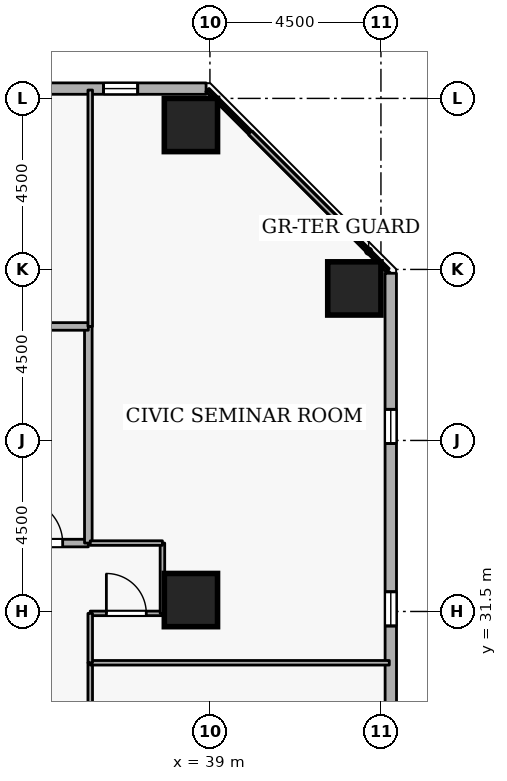
"""IFC4 building model, lengths in metres.
Left out: names, types, materials, properties, quantities, classifications, styles, units other than length and angle.
Written with IfcOpenShell. Run it as: python <this file> out.ifc"""

import sys

from ifc_helpers import new_model, si_unit, direction, frame, frame_2d, origin, origin_2d, place, context, subcontext, project, spatial, rectangle, extrude, element, fill, save


model = new_model("IFC4")
c1 = context("Model", 3, precision=1e-05, world=origin(), true_north=direction((0.0, 1.0)))
c2 = subcontext(c1, "Body", "Model", "MODEL_VIEW")
j1 = project(units=[si_unit("LENGTHUNIT", "METRE"), si_unit("PLANEANGLEUNIT", "RADIAN")], contexts=[c1])
p1 = place(None, origin())
s1 = spatial("IfcSite", under=j1, at=p1, CompositionType="ELEMENT")
p2 = place(p1, origin())
s2 = spatial("IfcBuilding", under=s1, at=p2, CompositionType="ELEMENT")
p3 = place(p2, frame((0.0, 0.0, 42.3)))
s3 = spatial("IfcBuildingStorey", under=s2, at=p3, CompositionType="ELEMENT", Elevation=42.3)
for number, where, z_axis, x_axis in (
    (1, (42.8, 40.0, 0.0), (0.0, 0.0, 1.0), (1.0, 0.0, 0.0)),
    (2, (38.5, 44.3, 0.0), (0.0, 0.0, 1.0), (1.0, 0.0, 0.0)),
    (3, (38.5, 31.8, 0.0), (0.0, 0.0, 1.0), (1.0, 0.0, 0.0)),
):
    element("IfcColumn", number, at=place(p3, frame(where, z_axis=z_axis, x_axis=x_axis)), inside=s3, PredefinedType="COLUMN", context=c2, shape_type="SweptSolid", body=[
        extrude(rectangle(XDim=1.4, YDim=1.4, at=origin_2d()), origin(), (0.0, 0.0, 1.0), 3.6),
    ])
p4 = place(p3, frame((43.765, 5.319, 0.0), z_axis=(0.0, 0.0, 1.0), x_axis=(-0.000208784245, 0.999999978205, 0.0)))
e4 = element("IfcWall", 4, at=p4, inside=s3, PredefinedType="STANDARD", context=c2, shape_type="SweptSolid", body=[
    extrude(rectangle(XDim=35.08, YDim=0.3, at=frame_2d((17.54, 0.0))), origin(), (0.0, 0.0, 1.0), 2.7),
])
p5 = place(p4, frame((1.8, 0.0, 0.72)))
e5 = element("IfcOpeningElement", 5, at=p5, cuts=e4, PredefinedType="OPENING", context=c2, shape_type="SweptSolid", body=[
    extrude(rectangle(XDim=0.9, YDim=1.75, at=frame_2d((0.45, 0.875))), frame((0.0, 0.16, 0.0), z_axis=(0.0, -1.0, 0.0), x_axis=(1.0, 0.0, 0.0)), (0.0, 0.0, 1.0), 0.32),
])
p6 = place(p4, frame((6.6, 0.0, 0.72)))
e6 = element("IfcOpeningElement", 6, at=p6, cuts=e4, PredefinedType="OPENING", context=c2, shape_type="SweptSolid", body=[
    extrude(rectangle(XDim=0.9, YDim=1.75, at=frame_2d((0.45, 0.875))), frame((0.0, 0.16, 0.0), z_axis=(0.0, -1.0, 0.0), x_axis=(1.0, 0.0, 0.0)), (0.0, 0.0, 1.0), 0.32),
])
p7 = place(p4, frame((11.4, 0.0, 0.72)))
e7 = element("IfcOpeningElement", 7, at=p7, cuts=e4, PredefinedType="OPENING", context=c2, shape_type="SweptSolid", body=[
    extrude(rectangle(XDim=0.9, YDim=1.75, at=frame_2d((0.45, 0.875))), frame((0.0, 0.16, 0.0), z_axis=(0.0, -1.0, 0.0), x_axis=(1.0, 0.0, 0.0)), (0.0, 0.0, 1.0), 0.32),
])
p8 = place(p4, frame((16.2, 0.0, 0.72)))
e8 = element("IfcOpeningElement", 8, at=p8, cuts=e4, PredefinedType="OPENING", context=c2, shape_type="SweptSolid", body=[
    extrude(rectangle(XDim=0.9, YDim=1.75, at=frame_2d((0.45, 0.875))), frame((0.0, 0.16, 0.0), z_axis=(0.0, -1.0, 0.0), x_axis=(1.0, 0.0, 0.0)), (0.0, 0.0, 1.0), 0.32),
])
p9 = place(p4, frame((25.8, 0.0, 0.72)))
e9 = element("IfcOpeningElement", 9, at=p9, cuts=e4, PredefinedType="OPENING", context=c2, shape_type="SweptSolid", body=[
    extrude(rectangle(XDim=0.9, YDim=1.75, at=frame_2d((0.45, 0.875))), frame((0.0, 0.16, 0.0), z_axis=(0.0, -1.0, 0.0), x_axis=(1.0, 0.0, 0.0)), (0.0, 0.0, 1.0), 0.32),
])
p10 = place(p4, frame((30.6, 0.0, 0.72)))
e10 = element("IfcOpeningElement", 10, at=p10, cuts=e4, PredefinedType="OPENING", context=c2, shape_type="SweptSolid", body=[
    extrude(rectangle(XDim=0.9, YDim=1.75, at=frame_2d((0.45, 0.875))), frame((0.0, 0.16, 0.0), z_axis=(0.0, -1.0, 0.0), x_axis=(1.0, 0.0, 0.0)), (0.0, 0.0, 1.0), 0.32),
])
p11 = place(p3, frame((38.899, 45.258, 0.0), z_axis=(0.0, 0.0, 1.0), x_axis=(-0.999999978205, 0.000208784245, 0.0)))
e11 = element("IfcWall", 11, at=p11, inside=s3, PredefinedType="STANDARD", context=c2, shape_type="SweptSolid", body=[
    extrude(rectangle(XDim=35.08, YDim=0.3, at=frame_2d((17.54, 0.0))), origin(), (0.0, 0.0, 1.0), 2.7),
])
p12 = place(p11, frame((1.8, 0.0, 0.72)))
e12 = element("IfcOpeningElement", 12, at=p12, cuts=e11, PredefinedType="OPENING", context=c2, shape_type="SweptSolid", body=[
    extrude(rectangle(XDim=0.9, YDim=1.75, at=frame_2d((0.45, 0.875))), frame((0.0, 0.16, 0.0), z_axis=(0.0, -1.0, 0.0), x_axis=(1.0, 0.0, 0.0)), (0.0, 0.0, 1.0), 0.32),
])
p13 = place(p11, frame((6.6, 0.0, 0.72)))
e13 = element("IfcOpeningElement", 13, at=p13, cuts=e11, PredefinedType="OPENING", context=c2, shape_type="SweptSolid", body=[
    extrude(rectangle(XDim=0.9, YDim=1.75, at=frame_2d((0.45, 0.875))), frame((0.0, 0.16, 0.0), z_axis=(0.0, -1.0, 0.0), x_axis=(1.0, 0.0, 0.0)), (0.0, 0.0, 1.0), 0.32),
])
p14 = place(p11, frame((11.4, 0.0, 0.72)))
e14 = element("IfcOpeningElement", 14, at=p14, cuts=e11, PredefinedType="OPENING", context=c2, shape_type="SweptSolid", body=[
    extrude(rectangle(XDim=0.9, YDim=1.75, at=frame_2d((0.45, 0.875))), frame((0.0, 0.16, 0.0), z_axis=(0.0, -1.0, 0.0), x_axis=(1.0, 0.0, 0.0)), (0.0, 0.0, 1.0), 0.32),
])
p15 = place(p11, frame((16.2, 0.0, 0.72)))
e15 = element("IfcOpeningElement", 15, at=p15, cuts=e11, PredefinedType="OPENING", context=c2, shape_type="SweptSolid", body=[
    extrude(rectangle(XDim=0.9, YDim=1.75, at=frame_2d((0.45, 0.875))), frame((0.0, 0.16, 0.0), z_axis=(0.0, -1.0, 0.0), x_axis=(1.0, 0.0, 0.0)), (0.0, 0.0, 1.0), 0.32),
])
p16 = place(p11, frame((21.0, 0.0, 0.72)))
e16 = element("IfcOpeningElement", 16, at=p16, cuts=e11, PredefinedType="OPENING", context=c2, shape_type="SweptSolid", body=[
    extrude(rectangle(XDim=0.9, YDim=1.75, at=frame_2d((0.45, 0.875))), frame((0.0, 0.16, 0.0), z_axis=(0.0, -1.0, 0.0), x_axis=(1.0, 0.0, 0.0)), (0.0, 0.0, 1.0), 0.32),
])
p17 = place(p11, frame((30.6, 0.0, 0.72)))
e17 = element("IfcOpeningElement", 17, at=p17, cuts=e11, PredefinedType="OPENING", context=c2, shape_type="SweptSolid", body=[
    extrude(rectangle(XDim=0.9, YDim=1.75, at=frame_2d((0.45, 0.875))), frame((0.0, 0.16, 0.0), z_axis=(0.0, -1.0, 0.0), x_axis=(1.0, 0.0, 0.0)), (0.0, 0.0, 1.0), 0.32),
])
p18 = place(p3, frame((33.3, 33.3, 0.0), z_axis=(0.0, 0.0, 1.0), x_axis=(1.0, 0.0, 0.0)))
e18 = element("IfcWall", 18, at=p18, inside=s3, PredefinedType="STANDARD", context=c2, shape_type="SweptSolid", body=[
    extrude(rectangle(XDim=2.5, YDim=0.2, at=frame_2d((1.25, 0.0))), origin(), (0.0, 0.0, 1.0), 3.34),
])
p19 = place(p18, frame((0.675, 0.0, 0.0)))
e19 = element("IfcOpeningElement", 19, at=p19, cuts=e18, PredefinedType="OPENING", context=c2, shape_type="SweptSolid", body=[
    extrude(rectangle(XDim=1.15, YDim=2.1, at=frame_2d((0.575, 1.05))), frame((0.0, 0.11, 0.0), z_axis=(0.0, -1.0, 0.0), x_axis=(1.0, 0.0, 0.0)), (0.0, 0.0, 1.0), 0.22),
])
p20 = place(p3, frame((35.8, 33.3, 0.0), z_axis=(0.0, 0.0, 1.0), x_axis=(0.0, 1.0, 0.0)))
e20 = element("IfcWall", 20, at=p20, inside=s3, PredefinedType="STANDARD", context=c2, shape_type="SweptSolid", body=[
    extrude(rectangle(XDim=5.7, YDim=0.2, at=frame_2d((2.85, 0.0))), origin(), (0.0, 0.0, 1.0), 3.34),
])
p21 = place(p3, frame((35.8, 39.0, 0.0), z_axis=(0.0, 0.0, 1.0), x_axis=(-1.0, 0.0, 0.0)))
e21 = element("IfcWall", 21, at=p21, inside=s3, PredefinedType="STANDARD", context=c2, shape_type="SweptSolid", body=[
    extrude(rectangle(XDim=2.5, YDim=0.2, at=frame_2d((1.25, 0.0))), origin(), (0.0, 0.0, 1.0), 3.34),
])
p22 = place(p3, frame((35.85, 27.0, 0.0), z_axis=(0.0, 0.0, 1.0), x_axis=(0.0, 1.0, 0.0)))
e22 = element("IfcWall", 22, at=p22, inside=s3, PredefinedType="PARTITIONING", context=c2, shape_type="SweptSolid", body=[
    extrude(rectangle(XDim=3.15, YDim=0.12, at=frame_2d((1.575, 0.0))), origin(), (0.0, 0.0, 1.0), 3.34),
])
p23 = place(p22, frame((1.1, 0.0, 0.0)))
e23 = element("IfcOpeningElement", 23, at=p23, cuts=e22, PredefinedType="OPENING", context=c2, shape_type="SweptSolid", body=[
    extrude(rectangle(XDim=0.95, YDim=2.1, at=frame_2d((0.475, 1.05))), frame((0.0, 0.07, 0.0), z_axis=(0.0, -1.0, 0.0), x_axis=(1.0, 0.0, 0.0)), (0.0, 0.0, 1.0), 0.14),
])
p24 = place(p3, frame((35.85, 30.15, 0.0), z_axis=(0.0, 0.0, 1.0), x_axis=(1.0, 0.0, 0.0)))
e24 = element("IfcWall", 24, at=p24, inside=s3, PredefinedType="PARTITIONING", context=c2, shape_type="SweptSolid", body=[
    extrude(rectangle(XDim=7.87, YDim=0.12, at=frame_2d((3.935, 0.0))), origin(), (0.0, 0.0, 1.0), 3.34),
])
p25 = place(p3, frame((35.85, 31.45, 0.0), z_axis=(0.0, 0.0, 1.0), x_axis=(1.0, 0.0, 0.0)))
e25 = element("IfcWall", 25, at=p25, inside=s3, PredefinedType="PARTITIONING", context=c2, shape_type="SweptSolid", body=[
    extrude(rectangle(XDim=1.9, YDim=0.12, at=frame_2d((0.95, 0.0))), origin(), (0.0, 0.0, 1.0), 3.34),
])
p26 = place(p25, frame((0.425, 0.0, 0.0)))
e26 = element("IfcOpeningElement", 26, at=p26, cuts=e25, PredefinedType="OPENING", context=c2, shape_type="SweptSolid", body=[
    extrude(rectangle(XDim=1.05, YDim=2.1, at=frame_2d((0.525, 1.05))), frame((0.0, 0.07, 0.0), z_axis=(0.0, -1.0, 0.0), x_axis=(1.0, 0.0, 0.0)), (0.0, 0.0, 1.0), 0.14),
])
p27 = place(p3, frame((37.75, 31.45, 0.0), z_axis=(0.0, 0.0, 1.0), x_axis=(0.0, 1.0, 0.0)))
e27 = element("IfcWall", 27, at=p27, inside=s3, PredefinedType="PARTITIONING", context=c2, shape_type="SweptSolid", body=[
    extrude(rectangle(XDim=1.85, YDim=0.12, at=frame_2d((0.925, 0.0))), origin(), (0.0, 0.0, 1.0), 3.34),
])
p28 = place(p3, frame((37.75, 33.3, 0.0), z_axis=(0.0, 0.0, 1.0), x_axis=(-1.0, 0.0, 0.0)))
e28 = element("IfcWall", 28, at=p28, inside=s3, PredefinedType="PARTITIONING", context=c2, shape_type="SweptSolid", body=[
    extrude(rectangle(XDim=1.9, YDim=0.12, at=frame_2d((0.95, 0.0))), origin(), (0.0, 0.0, 1.0), 3.34),
])
p29 = place(p3, frame((35.85, 39.0, 0.0), z_axis=(0.0, 0.0, 1.0), x_axis=(0.0, 1.0, 0.0)))
e29 = element("IfcWall", 29, at=p29, inside=s3, PredefinedType="PARTITIONING", context=c2, shape_type="SweptSolid", body=[
    extrude(rectangle(XDim=6.22, YDim=0.12, at=frame_2d((3.11, 0.0))), origin(), (0.0, 0.0, 1.0), 3.34),
])
p30 = place(p3, frame((38.934, 45.22, 0.0), z_axis=(0.0, 0.0, 1.0), x_axis=(0.707106781187, -0.707106781187, 0.0)))
e30 = element("IfcWall", 30, at=p30, inside=s3, PredefinedType="PARTITIONING", context=c2, shape_type="SweptSolid", body=[
    extrude(rectangle(XDim=6.703, YDim=0.12, at=frame_2d((3.352, 0.0))), origin(), (0.0, 0.0, 1.0), 3.34),
])
p31 = place(p3, frame((35.85, 30.15, 0.0), z_axis=(0.0, 0.0, 1.0), x_axis=(0.0, 1.0, 0.0)))
e31 = element("IfcWall", 31, at=p31, inside=s3, PredefinedType="PARTITIONING", context=c2, shape_type="SweptSolid", body=[
    extrude(rectangle(XDim=1.3, YDim=0.12, at=frame_2d((0.65, 0.0))), origin(), (0.0, 0.0, 1.0), 3.34),
])
p32 = place(p9, origin())
e32 = element("IfcWindow", 32, at=p32, inside=s3, PartitioningType="SINGLE_PANEL", PredefinedType="WINDOW", context=c2, shape_type="SweptSolid", body=[
    extrude(rectangle(XDim=0.9, YDim=1.75, at=frame_2d((0.45, 0.875))), frame((0.0, 0.03, 0.0), z_axis=(0.0, -1.0, 0.0), x_axis=(1.0, 0.0, 0.0)), (0.0, 0.0, 1.0), 0.06),
])
fill(e9, e32)
p33 = place(p10, origin())
e33 = element("IfcWindow", 33, at=p33, inside=s3, PartitioningType="SINGLE_PANEL", PredefinedType="WINDOW", context=c2, shape_type="SweptSolid", body=[
    extrude(rectangle(XDim=0.9, YDim=1.75, at=frame_2d((0.45, 0.875))), frame((0.0, 0.03, 0.0), z_axis=(0.0, -1.0, 0.0), x_axis=(1.0, 0.0, 0.0)), (0.0, 0.0, 1.0), 0.06),
])
fill(e10, e33)
p34 = place(p12, origin())
e34 = element("IfcWindow", 34, at=p34, inside=s3, PartitioningType="SINGLE_PANEL", PredefinedType="WINDOW", context=c2, shape_type="SweptSolid", body=[
    extrude(rectangle(XDim=0.9, YDim=1.75, at=frame_2d((0.45, 0.875))), frame((0.0, 0.03, 0.0), z_axis=(0.0, -1.0, 0.0), x_axis=(1.0, 0.0, 0.0)), (0.0, 0.0, 1.0), 0.06),
])
fill(e12, e34)
p35 = place(p19, origin())
e35 = element("IfcDoor", 35, at=p35, inside=s3, OperationType="SINGLE_SWING_LEFT", PredefinedType="DOOR", context=c2, shape_type="SweptSolid", body=[
    extrude(rectangle(XDim=1.15, YDim=2.1, at=frame_2d((0.575, 1.05))), frame((0.0, 0.025, 0.0), z_axis=(0.0, -1.0, 0.0), x_axis=(1.0, 0.0, 0.0)), (0.0, 0.0, 1.0), 0.05),
])
fill(e19, e35)
p36 = place(p26, origin())
e36 = element("IfcDoor", 36, at=p36, inside=s3, OperationType="SINGLE_SWING_LEFT", PredefinedType="DOOR", context=c2, shape_type="SweptSolid", body=[
    extrude(rectangle(XDim=1.05, YDim=2.1, at=frame_2d((0.525, 1.05))), frame((0.0, 0.025, 0.0), z_axis=(0.0, -1.0, 0.0), x_axis=(1.0, 0.0, 0.0)), (0.0, 0.0, 1.0), 0.05),
])
fill(e26, e36)
save(model, sys.argv[1])
